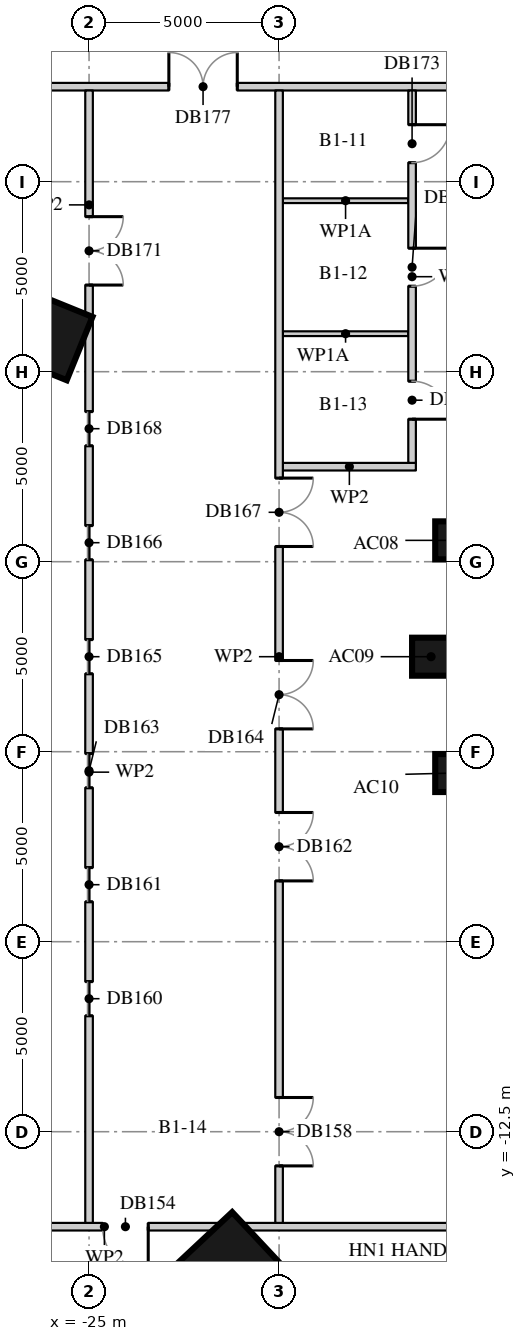
"""IFC4 building model, lengths in metres.
Left out: names, types, materials, properties, quantities, classifications, styles, units other than length and angle.
Written with IfcOpenShell. Run it as: python <this file> out.ifc"""

import sys

from ifc_helpers import new_model, si_unit, direction, frame, frame_2d, origin, origin_2d, place, context, subcontext, project, spatial, rectangle, extrude, element, fill, save


model = new_model("IFC4")
c1 = context("Model", 3, precision=1e-05, world=origin(), true_north=direction((0.0, 1.0)))
c2 = subcontext(c1, "Body", "Model", "MODEL_VIEW")
j1 = project(units=[si_unit("LENGTHUNIT", "METRE"), si_unit("PLANEANGLEUNIT", "RADIAN")], contexts=[c1])
p1 = place(None, origin())
s1 = spatial("IfcSite", under=j1, at=p1, CompositionType="ELEMENT")
p2 = place(p1, origin())
s2 = spatial("IfcBuilding", under=s1, at=p2, CompositionType="ELEMENT")
p3 = place(p2, frame((0.0, 0.0, -5.2)))
s3 = spatial("IfcBuildingStorey", under=s2, at=p3, CompositionType="ELEMENT", Elevation=-5.2)
for number, where, z_axis, x_axis in (
    (1, (-26.546, 8.636, 0.0), (0.0, 0.0, 1.0), (-0.927, 0.376, 0.0)),
    (2, (-21.641, -16.23, 0.0), (0.0, 0.0, 1.0), (-0.73, -0.683, 0.0)),
):
    element("IfcColumn", number, at=place(p3, frame(where, z_axis=z_axis, x_axis=x_axis)), inside=s3, PredefinedType="COLUMN", context=c2, shape_type="SweptSolid", body=[
        extrude(rectangle(XDim=2.8, YDim=1.8, at=origin_2d()), origin(), (0.0, 0.0, 1.0), 5.2),
    ])
for number, where, z_axis, x_axis in (
    (3, (-15.391, 3.062, 0.0), (0.0, 0.0, 1.0), (1.0, 0.0, 0.0)),
    (4, (-16.0, 0.0, 0.0), (0.0, 0.0, 1.0), (1.0, 0.0, 0.0)),
    (5, (-15.391, -3.062, 0.0), (0.0, 0.0, 1.0), (1.0, 0.0, 0.0)),
):
    element("IfcColumn", number, at=place(p3, frame(where, z_axis=z_axis, x_axis=x_axis)), inside=s3, PredefinedType="COLUMN", context=c2, shape_type="SweptSolid", body=[
        extrude(rectangle(XDim=1.0, YDim=1.0, at=origin_2d()), origin(), (0.0, 0.0, 1.0), 5.2),
    ])
p4 = place(p3, frame((-27.65, -15.0, 0.0), z_axis=(0.0, 0.0, 1.0), x_axis=(1.0, 0.0, 0.0)))
e6 = element("IfcWall", 6, at=p4, inside=s3, PredefinedType="PARTITIONING", context=c2, shape_type="SweptSolid", body=[
    extrude(rectangle(XDim=6.107, YDim=0.2, at=frame_2d((3.053, 0.0))), origin(), (0.0, 0.0, 1.0), 4.79),
])
p5 = place(p4, frame((3.007, 0.0, 0.0)))
e7 = element("IfcOpeningElement", 7, at=p5, cuts=e6, PredefinedType="OPENING", context=c2, shape_type="SweptSolid", body=[
    extrude(rectangle(XDim=1.2, YDim=2.1, at=frame_2d((0.6, 1.05))), frame((0.0, 0.11, 0.0), z_axis=(0.0, -1.0, 0.0), x_axis=(1.0, 0.0, 0.0)), (0.0, 0.0, 1.0), 0.22),
])
p6 = place(p3, frame((-20.971, -15.0, 0.0), z_axis=(0.0, 0.0, 1.0), x_axis=(1.0, 0.0, 0.0)))
e8 = element("IfcWall", 8, at=p6, inside=s3, PredefinedType="PARTITIONING", context=c2, shape_type="SweptSolid", body=[
    extrude(rectangle(XDim=25.071, YDim=0.2, at=frame_2d((12.536, 0.0))), origin(), (0.0, 0.0, 1.0), 4.19),
])
p7 = place(p6, frame((12.071, 0.0, 0.0)))
e9 = element("IfcOpeningElement", 9, at=p7, cuts=e8, PredefinedType="OPENING", context=c2, shape_type="SweptSolid", body=[
    extrude(rectangle(XDim=1.8, YDim=2.1, at=frame_2d((0.9, 1.05))), frame((0.0, 0.11, 0.0), z_axis=(0.0, -1.0, 0.0), x_axis=(1.0, 0.0, 0.0)), (0.0, 0.0, 1.0), 0.22),
])
p8 = place(p3, frame((-19.9, 5.0, 0.0), z_axis=(0.0, 0.0, 1.0), x_axis=(1.0, 0.0, 0.0)))
e10 = element("IfcWall", 10, at=p8, inside=s3, PredefinedType="PARTITIONING", context=c2, shape_type="SweptSolid", body=[
    extrude(rectangle(XDim=3.5, YDim=0.2, at=frame_2d((1.75, 0.0))), origin(), (0.0, 0.0, 1.0), 4.79),
])
for number, where, z_axis, x_axis in (
    (11, (-19.9, 8.5, 0.0), (0.0, 0.0, 1.0), (1.0, 0.0, 0.0)),
    (12, (-19.9, 12.0, 0.0), (0.0, 0.0, 1.0), (1.0, 0.0, 0.0)),
):
    element("IfcWall", number, at=place(p3, frame(where, z_axis=z_axis, x_axis=x_axis)), inside=s3, PredefinedType="PARTITIONING", context=c2, shape_type="SweptSolid", body=[
        extrude(rectangle(XDim=3.3, YDim=0.125, at=frame_2d((1.65, 0.0))), origin(), (0.0, 0.0, 1.0), 4.24),
    ])
p9 = place(p3, frame((-27.65, 15.0, 0.0), z_axis=(0.0, 0.0, 1.0), x_axis=(1.0, 0.0, 0.0)))
e13 = element("IfcWall", 13, at=p9, inside=s3, PredefinedType="PARTITIONING", context=c2, shape_type="SweptSolid", body=[
    extrude(rectangle(XDim=31.75, YDim=0.2, at=frame_2d((15.875, 0.0))), origin(), (0.0, 0.0, 1.0), 4.19),
])
p10 = place(p9, frame((4.75, 0.0, 0.0)))
e14 = element("IfcOpeningElement", 14, at=p10, cuts=e13, PredefinedType="OPENING", context=c2, shape_type="SweptSolid", body=[
    extrude(rectangle(XDim=1.8, YDim=2.1, at=frame_2d((0.9, 1.05))), frame((0.0, 0.11, 0.0), z_axis=(0.0, -1.0, 0.0), x_axis=(1.0, 0.0, 0.0)), (0.0, 0.0, 1.0), 0.22),
])
p11 = place(p9, frame((18.75, 0.0, 0.0)))
e15 = element("IfcOpeningElement", 15, at=p11, cuts=e13, PredefinedType="OPENING", context=c2, shape_type="SweptSolid", body=[
    extrude(rectangle(XDim=1.8, YDim=2.1, at=frame_2d((0.9, 1.05))), frame((0.0, 0.11, 0.0), z_axis=(0.0, -1.0, 0.0), x_axis=(1.0, 0.0, 0.0)), (0.0, 0.0, 1.0), 0.22),
])
p12 = place(p3, frame((-25.0, -14.9, 0.0), z_axis=(0.0, 0.0, 1.0), x_axis=(0.0, 1.0, 0.0)))
e16 = element("IfcWall", 16, at=p12, inside=s3, PredefinedType="PARTITIONING", context=c2, shape_type="SweptSolid", body=[
    extrude(rectangle(XDim=23.723, YDim=0.2, at=frame_2d((11.861, 0.0))), origin(), (0.0, 0.0, 1.0), 4.79),
])
p13 = place(p12, frame((5.45, 0.0, 0.0)))
e17 = element("IfcOpeningElement", 17, at=p13, cuts=e16, PredefinedType="OPENING", context=c2, shape_type="SweptSolid", body=[
    extrude(rectangle(XDim=0.9, YDim=2.1, at=frame_2d((0.45, 1.05))), frame((0.0, 0.11, 0.0), z_axis=(0.0, -1.0, 0.0), x_axis=(1.0, 0.0, 0.0)), (0.0, 0.0, 1.0), 0.22),
])
p14 = place(p12, frame((8.45, 0.0, 0.0)))
e18 = element("IfcOpeningElement", 18, at=p14, cuts=e16, PredefinedType="OPENING", context=c2, shape_type="SweptSolid", body=[
    extrude(rectangle(XDim=0.9, YDim=2.1, at=frame_2d((0.45, 1.05))), frame((0.0, 0.11, 0.0), z_axis=(0.0, -1.0, 0.0), x_axis=(1.0, 0.0, 0.0)), (0.0, 0.0, 1.0), 0.22),
])
p15 = place(p12, frame((11.45, 0.0, 0.0)))
e19 = element("IfcOpeningElement", 19, at=p15, cuts=e16, PredefinedType="OPENING", context=c2, shape_type="SweptSolid", body=[
    extrude(rectangle(XDim=0.9, YDim=2.1, at=frame_2d((0.45, 1.05))), frame((0.0, 0.11, 0.0), z_axis=(0.0, -1.0, 0.0), x_axis=(1.0, 0.0, 0.0)), (0.0, 0.0, 1.0), 0.22),
])
p16 = place(p12, frame((14.45, 0.0, 0.0)))
e20 = element("IfcOpeningElement", 20, at=p16, cuts=e16, PredefinedType="OPENING", context=c2, shape_type="SweptSolid", body=[
    extrude(rectangle(XDim=0.9, YDim=2.1, at=frame_2d((0.45, 1.05))), frame((0.0, 0.11, 0.0), z_axis=(0.0, -1.0, 0.0), x_axis=(1.0, 0.0, 0.0)), (0.0, 0.0, 1.0), 0.22),
])
p17 = place(p12, frame((17.45, 0.0, 0.0)))
e21 = element("IfcOpeningElement", 21, at=p17, cuts=e16, PredefinedType="OPENING", context=c2, shape_type="SweptSolid", body=[
    extrude(rectangle(XDim=0.9, YDim=2.1, at=frame_2d((0.45, 1.05))), frame((0.0, 0.11, 0.0), z_axis=(0.0, -1.0, 0.0), x_axis=(1.0, 0.0, 0.0)), (0.0, 0.0, 1.0), 0.22),
])
p18 = place(p12, frame((20.45, 0.0, 0.0)))
e22 = element("IfcOpeningElement", 22, at=p18, cuts=e16, PredefinedType="OPENING", context=c2, shape_type="SweptSolid", body=[
    extrude(rectangle(XDim=0.9, YDim=2.1, at=frame_2d((0.45, 1.05))), frame((0.0, 0.11, 0.0), z_axis=(0.0, -1.0, 0.0), x_axis=(1.0, 0.0, 0.0)), (0.0, 0.0, 1.0), 0.22),
])
p19 = place(p3, frame((-25.0, 8.88, 0.0), z_axis=(0.0, 0.0, 1.0), x_axis=(0.0, 1.0, 0.0)))
e23 = element("IfcWall", 23, at=p19, inside=s3, PredefinedType="PARTITIONING", context=c2, shape_type="SweptSolid", body=[
    extrude(rectangle(XDim=6.02, YDim=0.2, at=frame_2d((3.01, 0.0))), origin(), (0.0, 0.0, 1.0), 4.79),
])
p20 = place(p19, frame((0.9, 0.0, 0.0)))
e24 = element("IfcOpeningElement", 24, at=p20, cuts=e23, PredefinedType="OPENING", context=c2, shape_type="SweptSolid", body=[
    extrude(rectangle(XDim=1.8, YDim=2.1, at=frame_2d((0.9, 1.05))), frame((0.0, 0.11, 0.0), z_axis=(0.0, -1.0, 0.0), x_axis=(1.0, 0.0, 0.0)), (0.0, 0.0, 1.0), 0.22),
])
p21 = place(p3, frame((-20.0, -14.9, 0.0), z_axis=(0.0, 0.0, 1.0), x_axis=(0.0, 1.0, 0.0)))
e25 = element("IfcWall", 25, at=p21, inside=s3, PredefinedType="PARTITIONING", context=c2, shape_type="SweptSolid", body=[
    extrude(rectangle(XDim=29.8, YDim=0.2, at=frame_2d((14.9, 0.0))), origin(), (0.0, 0.0, 1.0), 4.79),
])
p22 = place(p21, frame((1.5, 0.0, 0.0)))
e26 = element("IfcOpeningElement", 26, at=p22, cuts=e25, PredefinedType="OPENING", context=c2, shape_type="SweptSolid", body=[
    extrude(rectangle(XDim=1.8, YDim=2.1, at=frame_2d((0.9, 1.05))), frame((0.0, 0.11, 0.0), z_axis=(0.0, -1.0, 0.0), x_axis=(1.0, 0.0, 0.0)), (0.0, 0.0, 1.0), 0.22),
])
p23 = place(p21, frame((9.0, 0.0, 0.0)))
e27 = element("IfcOpeningElement", 27, at=p23, cuts=e25, PredefinedType="OPENING", context=c2, shape_type="SweptSolid", body=[
    extrude(rectangle(XDim=1.8, YDim=2.1, at=frame_2d((0.9, 1.05))), frame((0.0, 0.11, 0.0), z_axis=(0.0, -1.0, 0.0), x_axis=(1.0, 0.0, 0.0)), (0.0, 0.0, 1.0), 0.22),
])
p24 = place(p21, frame((13.0, 0.0, 0.0)))
e28 = element("IfcOpeningElement", 28, at=p24, cuts=e25, PredefinedType="OPENING", context=c2, shape_type="SweptSolid", body=[
    extrude(rectangle(XDim=1.8, YDim=2.1, at=frame_2d((0.9, 1.05))), frame((0.0, 0.11, 0.0), z_axis=(0.0, -1.0, 0.0), x_axis=(1.0, 0.0, 0.0)), (0.0, 0.0, 1.0), 0.22),
])
p25 = place(p21, frame((17.8, 0.0, 0.0)))
e29 = element("IfcOpeningElement", 29, at=p25, cuts=e25, PredefinedType="OPENING", context=c2, shape_type="SweptSolid", body=[
    extrude(rectangle(XDim=1.8, YDim=2.1, at=frame_2d((0.9, 1.05))), frame((0.0, 0.11, 0.0), z_axis=(0.0, -1.0, 0.0), x_axis=(1.0, 0.0, 0.0)), (0.0, 0.0, 1.0), 0.22),
])
p26 = place(p3, frame((-16.5, 5.1, 0.0), z_axis=(0.0, 0.0, 1.0), x_axis=(0.0, 1.0, 0.0)))
e30 = element("IfcWall", 30, at=p26, inside=s3, PredefinedType="PARTITIONING", context=c2, shape_type="SweptSolid", body=[
    extrude(rectangle(XDim=9.8, YDim=0.2, at=frame_2d((4.9, 0.0))), origin(), (0.0, 0.0, 1.0), 4.79),
])
p27 = place(p26, frame((7.9, 0.0, 0.0)))
e31 = element("IfcOpeningElement", 31, at=p27, cuts=e30, PredefinedType="OPENING", context=c2, shape_type="SweptSolid", body=[
    extrude(rectangle(XDim=1.0, YDim=2.1, at=frame_2d((0.5, 1.05))), frame((0.0, 0.11, 0.0), z_axis=(0.0, -1.0, 0.0), x_axis=(1.0, 0.0, 0.0)), (0.0, 0.0, 1.0), 0.22),
])
p28 = place(p26, frame((4.65, 0.0, 0.0)))
e32 = element("IfcOpeningElement", 32, at=p28, cuts=e30, PredefinedType="OPENING", context=c2, shape_type="SweptSolid", body=[
    extrude(rectangle(XDim=1.0, YDim=2.1, at=frame_2d((0.5, 1.05))), frame((0.0, 0.11, 0.0), z_axis=(0.0, -1.0, 0.0), x_axis=(1.0, 0.0, 0.0)), (0.0, 0.0, 1.0), 0.22),
])
p29 = place(p26, frame((1.15, 0.0, 0.0)))
e33 = element("IfcOpeningElement", 33, at=p29, cuts=e30, PredefinedType="OPENING", context=c2, shape_type="SweptSolid", body=[
    extrude(rectangle(XDim=1.0, YDim=2.1, at=frame_2d((0.5, 1.05))), frame((0.0, 0.11, 0.0), z_axis=(0.0, -1.0, 0.0), x_axis=(1.0, 0.0, 0.0)), (0.0, 0.0, 1.0), 0.22),
])
p30 = place(p10, origin())
e34 = element("IfcDoor", 34, at=p30, inside=s3, OperationType="DOUBLE_DOOR_SINGLE_SWING", PredefinedType="DOOR", context=c2, shape_type="SweptSolid", body=[
    extrude(rectangle(XDim=1.8, YDim=2.1, at=frame_2d((0.9, 1.05))), frame((0.0, 0.025, 0.0), z_axis=(0.0, -1.0, 0.0), x_axis=(1.0, 0.0, 0.0)), (0.0, 0.0, 1.0), 0.05),
])
fill(e14, e34)
p31 = place(p5, origin())
e35 = element("IfcDoor", 35, at=p31, inside=s3, OperationType="SINGLE_SWING_LEFT", PredefinedType="DOOR", context=c2, shape_type="SweptSolid", body=[
    extrude(rectangle(XDim=1.2, YDim=2.1, at=frame_2d((0.6, 1.05))), frame((0.0, 0.025, 0.0), z_axis=(0.0, -1.0, 0.0), x_axis=(1.0, 0.0, 0.0)), (0.0, 0.0, 1.0), 0.05),
])
fill(e7, e35)
p32 = place(p13, origin())
e36 = element("IfcDoor", 36, at=p32, inside=s3, OperationType="SLIDING_TO_LEFT", PredefinedType="GATE", context=c2, shape_type="SweptSolid", body=[
    extrude(rectangle(XDim=0.9, YDim=2.1, at=frame_2d((0.45, 1.05))), frame((0.0, 0.025, 0.0), z_axis=(0.0, -1.0, 0.0), x_axis=(1.0, 0.0, 0.0)), (0.0, 0.0, 1.0), 0.05),
])
fill(e17, e36)
p33 = place(p14, origin())
e37 = element("IfcDoor", 37, at=p33, inside=s3, OperationType="SLIDING_TO_LEFT", PredefinedType="GATE", context=c2, shape_type="SweptSolid", body=[
    extrude(rectangle(XDim=0.9, YDim=2.1, at=frame_2d((0.45, 1.05))), frame((0.0, 0.025, 0.0), z_axis=(0.0, -1.0, 0.0), x_axis=(1.0, 0.0, 0.0)), (0.0, 0.0, 1.0), 0.05),
])
fill(e18, e37)
p34 = place(p15, origin())
e38 = element("IfcDoor", 38, at=p34, inside=s3, OperationType="SLIDING_TO_RIGHT", PredefinedType="GATE", context=c2, shape_type="SweptSolid", body=[
    extrude(rectangle(XDim=0.9, YDim=2.1, at=frame_2d((0.45, 1.05))), frame((0.0, 0.025, 0.0), z_axis=(0.0, -1.0, 0.0), x_axis=(1.0, 0.0, 0.0)), (0.0, 0.0, 1.0), 0.05),
])
fill(e19, e38)
p35 = place(p16, origin())
e39 = element("IfcDoor", 39, at=p35, inside=s3, OperationType="SLIDING_TO_RIGHT", PredefinedType="GATE", context=c2, shape_type="SweptSolid", body=[
    extrude(rectangle(XDim=0.9, YDim=2.1, at=frame_2d((0.45, 1.05))), frame((0.0, 0.025, 0.0), z_axis=(0.0, -1.0, 0.0), x_axis=(1.0, 0.0, 0.0)), (0.0, 0.0, 1.0), 0.05),
])
fill(e20, e39)
p36 = place(p17, origin())
e40 = element("IfcDoor", 40, at=p36, inside=s3, OperationType="SLIDING_TO_RIGHT", PredefinedType="GATE", context=c2, shape_type="SweptSolid", body=[
    extrude(rectangle(XDim=0.9, YDim=2.1, at=frame_2d((0.45, 1.05))), frame((0.0, 0.025, 0.0), z_axis=(0.0, -1.0, 0.0), x_axis=(1.0, 0.0, 0.0)), (0.0, 0.0, 1.0), 0.05),
])
fill(e21, e40)
p37 = place(p18, origin())
e41 = element("IfcDoor", 41, at=p37, inside=s3, OperationType="SLIDING_TO_RIGHT", PredefinedType="GATE", context=c2, shape_type="SweptSolid", body=[
    extrude(rectangle(XDim=0.9, YDim=2.1, at=frame_2d((0.45, 1.05))), frame((0.0, 0.025, 0.0), z_axis=(0.0, -1.0, 0.0), x_axis=(1.0, 0.0, 0.0)), (0.0, 0.0, 1.0), 0.05),
])
fill(e22, e41)
p38 = place(p20, origin())
e42 = element("IfcDoor", 42, at=p38, inside=s3, OperationType="DOUBLE_DOOR_SINGLE_SWING", PredefinedType="DOOR", context=c2, shape_type="SweptSolid", body=[
    extrude(rectangle(XDim=1.8, YDim=2.1, at=frame_2d((0.9, 1.05))), frame((0.0, 0.025, 0.0), z_axis=(0.0, -1.0, 0.0), x_axis=(1.0, 0.0, 0.0)), (0.0, 0.0, 1.0), 0.05),
])
fill(e24, e42)
p39 = place(p22, origin())
e43 = element("IfcDoor", 43, at=p39, inside=s3, OperationType="DOUBLE_DOOR_SINGLE_SWING", PredefinedType="DOOR", context=c2, shape_type="SweptSolid", body=[
    extrude(rectangle(XDim=1.8, YDim=2.1, at=frame_2d((0.9, 1.05))), frame((0.0, 0.025, 0.0), z_axis=(0.0, -1.0, 0.0), x_axis=(1.0, 0.0, 0.0)), (0.0, 0.0, 1.0), 0.05),
])
fill(e26, e43)
p40 = place(p23, origin())
e44 = element("IfcDoor", 44, at=p40, inside=s3, OperationType="DOUBLE_DOOR_SINGLE_SWING", PredefinedType="DOOR", context=c2, shape_type="SweptSolid", body=[
    extrude(rectangle(XDim=1.8, YDim=2.1, at=frame_2d((0.9, 1.05))), frame((0.0, 0.025, 0.0), z_axis=(0.0, -1.0, 0.0), x_axis=(1.0, 0.0, 0.0)), (0.0, 0.0, 1.0), 0.05),
])
fill(e27, e44)
p41 = place(p24, origin())
e45 = element("IfcDoor", 45, at=p41, inside=s3, OperationType="DOUBLE_DOOR_SINGLE_SWING", PredefinedType="DOOR", context=c2, shape_type="SweptSolid", body=[
    extrude(rectangle(XDim=1.8, YDim=2.1, at=frame_2d((0.9, 1.05))), frame((0.0, 0.025, 0.0), z_axis=(0.0, -1.0, 0.0), x_axis=(1.0, 0.0, 0.0)), (0.0, 0.0, 1.0), 0.05),
])
fill(e28, e45)
p42 = place(p25, origin())
e46 = element("IfcDoor", 46, at=p42, inside=s3, OperationType="DOUBLE_DOOR_SINGLE_SWING", PredefinedType="DOOR", context=c2, shape_type="SweptSolid", body=[
    extrude(rectangle(XDim=1.8, YDim=2.1, at=frame_2d((0.9, 1.05))), frame((0.0, 0.025, 0.0), z_axis=(0.0, -1.0, 0.0), x_axis=(1.0, 0.0, 0.0)), (0.0, 0.0, 1.0), 0.05),
])
fill(e29, e46)
p43 = place(p27, origin())
e47 = element("IfcDoor", 47, at=p43, inside=s3, OperationType="SINGLE_SWING_LEFT", PredefinedType="DOOR", context=c2, shape_type="SweptSolid", body=[
    extrude(rectangle(XDim=1.0, YDim=2.1, at=frame_2d((0.5, 1.05))), frame((0.0, 0.025, 0.0), z_axis=(0.0, -1.0, 0.0), x_axis=(1.0, 0.0, 0.0)), (0.0, 0.0, 1.0), 0.05),
])
fill(e31, e47)
p44 = place(p28, origin())
e48 = element("IfcDoor", 48, at=p44, inside=s3, OperationType="SINGLE_SWING_LEFT", PredefinedType="DOOR", context=c2, shape_type="SweptSolid", body=[
    extrude(rectangle(XDim=1.0, YDim=2.1, at=frame_2d((0.5, 1.05))), frame((0.0, 0.025, 0.0), z_axis=(0.0, -1.0, 0.0), x_axis=(1.0, 0.0, 0.0)), (0.0, 0.0, 1.0), 0.05),
])
fill(e32, e48)
p45 = place(p29, origin())
e49 = element("IfcDoor", 49, at=p45, inside=s3, OperationType="SINGLE_SWING_RIGHT", PredefinedType="DOOR", context=c2, shape_type="SweptSolid", body=[
    extrude(rectangle(XDim=1.0, YDim=2.1, at=frame_2d((0.5, 1.05))), frame((0.0, 0.025, 0.0), z_axis=(0.0, -1.0, 0.0), x_axis=(1.0, 0.0, 0.0)), (0.0, 0.0, 1.0), 0.05),
])
fill(e33, e49)
save(model, sys.argv[1])
